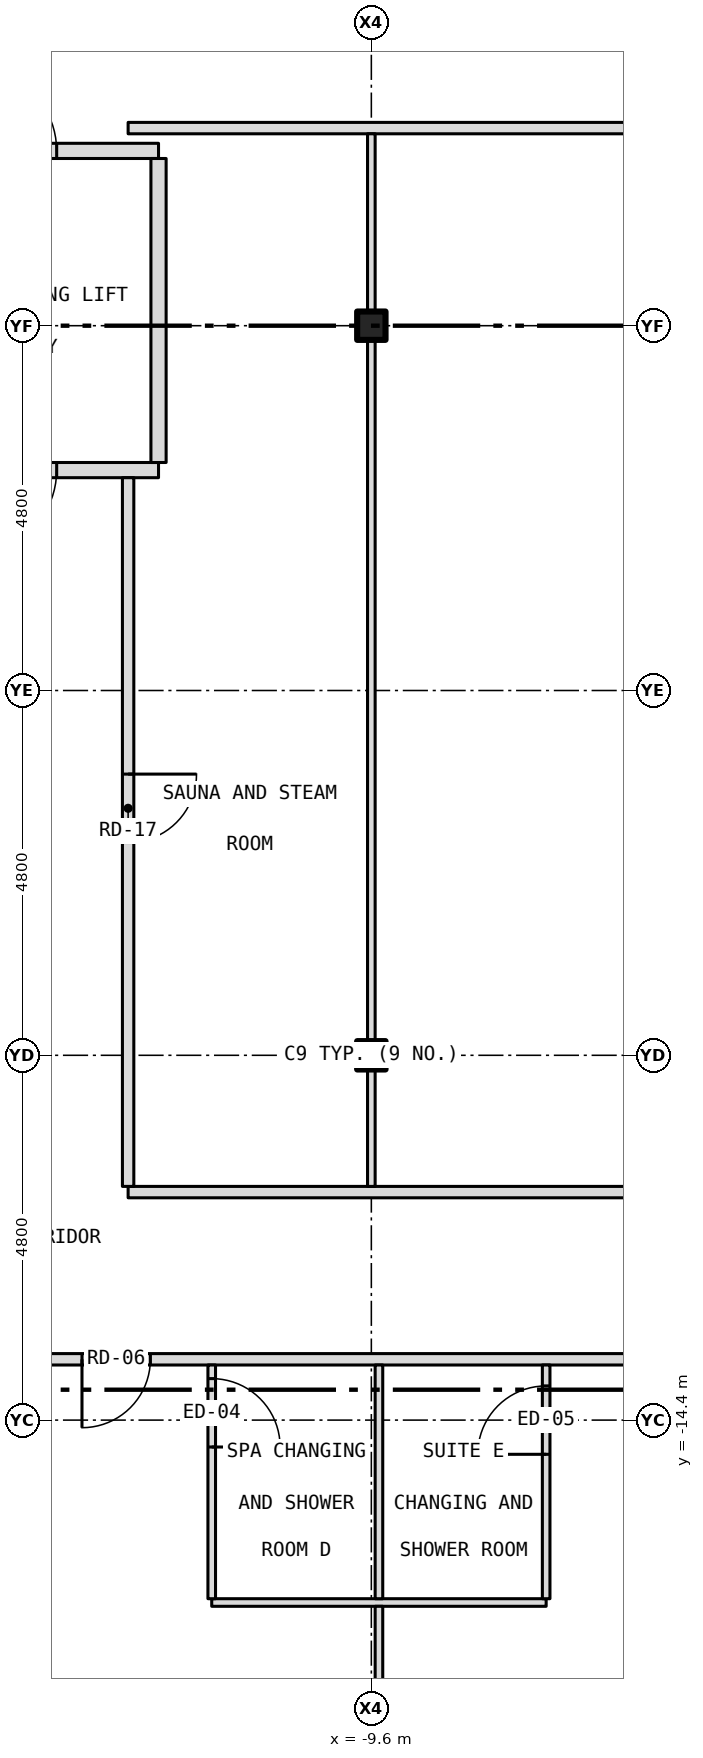
"""IFC4 building model, lengths in metres.
Left out: names, types, materials, properties, quantities, classifications, styles, units other than length and angle.
Written with IfcOpenShell. Run it as: python <this file> out.ifc"""

import sys

from ifc_helpers import new_model, si_unit, direction, frame, frame_2d, origin, origin_2d, place, context, subcontext, project, spatial, rectangle, i_section, extrude, element, fill, save


model = new_model("IFC4")
c1 = context("Model", 3, precision=1e-05, world=origin(), true_north=direction((0.0, 1.0)))
c2 = subcontext(c1, "Body", "Model", "MODEL_VIEW")
j1 = project(units=[si_unit("LENGTHUNIT", "METRE"), si_unit("PLANEANGLEUNIT", "RADIAN")], contexts=[c1])
p1 = place(None, origin())
s1 = spatial("IfcSite", under=j1, at=p1, CompositionType="ELEMENT")
p2 = place(p1, origin())
s2 = spatial("IfcBuilding", under=s1, at=p2, CompositionType="ELEMENT")
p3 = place(p2, frame((0.0, 0.0, 142.5)))
s3 = spatial("IfcBuildingStorey", under=s2, at=p3, CompositionType="ELEMENT", Elevation=142.5)
for number, where, z_axis, x_axis in (
    (1, (-9.6, -9.6, -0.2), (0.0, 0.0, 1.0), (1.0, 0.0, 0.0)),
    (2, (-9.6, 0.0, -0.2), (0.0, 0.0, 1.0), (1.0, 0.0, 0.0)),
):
    element("IfcColumn", number, at=place(p3, frame(where, z_axis=z_axis, x_axis=x_axis)), inside=s3, PredefinedType="COLUMN", context=c2, shape_type="SweptSolid", body=[
        extrude(i_section(OverallWidth=0.373, OverallDepth=0.373, WebThickness=0.016, FlangeThickness=0.026, at=origin_2d()), origin(), (0.0, 0.0, 1.0), 5.55),
    ])
p4 = place(p3, frame((-11.7, -16.8, 0.0), z_axis=(0.0, 0.0, 1.0), x_axis=(1.0, 0.0, 0.0)))
e3 = element("IfcWall", 3, at=p4, inside=s3, PredefinedType="PARTITIONING", context=c2, shape_type="SweptSolid", body=[
    extrude(rectangle(XDim=4.4, YDim=0.1, at=frame_2d((2.2, 0.0))), origin(), (0.0, 0.0, 1.0), 5.35),
])
p5 = place(p3, frame((-15.8, -13.6, 0.0), z_axis=(0.0, 0.0, 1.0), x_axis=(1.0, 0.0, 0.0)))
e4 = element("IfcWall", 4, at=p5, inside=s3, PredefinedType="PARTITIONING", context=c2, shape_type="SweptSolid", body=[
    extrude(rectangle(XDim=31.6, YDim=0.15, at=frame_2d((15.8, 0.0))), origin(), (0.0, 0.0, 1.0), 5.35),
])
p6 = place(p5, frame((2.393, 0.0, 0.0)))
e5 = element("IfcOpeningElement", 5, at=p6, cuts=e4, PredefinedType="OPENING", context=c2, shape_type="SweptSolid", body=[
    extrude(rectangle(XDim=0.9, YDim=2.1, at=frame_2d((0.45, 1.05))), frame((0.0, 0.087, 0.0), z_axis=(0.0, -1.0, 0.0), x_axis=(1.0, 0.0, 0.0)), (0.0, 0.0, 1.0), 0.174),
])
p7 = place(p5, frame((13.216, 0.0, 0.0)))
e6 = element("IfcOpeningElement", 6, at=p7, cuts=e4, PredefinedType="OPENING", context=c2, shape_type="SweptSolid", body=[
    extrude(rectangle(XDim=0.9, YDim=2.1, at=frame_2d((0.45, 1.05))), frame((0.0, 0.087, 0.0), z_axis=(0.0, -1.0, 0.0), x_axis=(1.0, 0.0, 0.0)), (0.0, 0.0, 1.0), 0.174),
])
p8 = place(p5, frame((16.622, 0.0, 0.0)))
e7 = element("IfcOpeningElement", 7, at=p8, cuts=e4, PredefinedType="OPENING", context=c2, shape_type="SweptSolid", body=[
    extrude(rectangle(XDim=0.9, YDim=2.1, at=frame_2d((0.45, 1.05))), frame((0.0, 0.087, 0.0), z_axis=(0.0, -1.0, 0.0), x_axis=(1.0, 0.0, 0.0)), (0.0, 0.0, 1.0), 0.174),
])
p9 = place(p5, frame((22.228, 0.0, 0.0)))
e8 = element("IfcOpeningElement", 8, at=p9, cuts=e4, PredefinedType="OPENING", context=c2, shape_type="SweptSolid", body=[
    extrude(rectangle(XDim=0.9, YDim=2.1, at=frame_2d((0.45, 1.05))), frame((0.0, 0.087, 0.0), z_axis=(0.0, -1.0, 0.0), x_axis=(1.0, 0.0, 0.0)), (0.0, 0.0, 1.0), 0.174),
])
p10 = place(p3, frame((-12.8, -11.4, 0.0), z_axis=(0.0, 0.0, 1.0), x_axis=(1.0, 0.0, 0.0)))
e9 = element("IfcWall", 9, at=p10, inside=s3, PredefinedType="PARTITIONING", context=c2, shape_type="SweptSolid", body=[
    extrude(rectangle(XDim=20.3, YDim=0.15, at=frame_2d((10.15, 0.0))), origin(), (0.0, 0.0, 1.0), 5.35),
])
p11 = place(p10, frame((11.3, 0.0, 0.0)))
e10 = element("IfcOpeningElement", 10, at=p11, cuts=e9, PredefinedType="OPENING", context=c2, shape_type="SweptSolid", body=[
    extrude(rectangle(XDim=0.9, YDim=2.1, at=frame_2d((0.45, 1.05))), frame((0.0, 0.087, 0.0), z_axis=(0.0, -1.0, 0.0), x_axis=(1.0, 0.0, 0.0)), (0.0, 0.0, 1.0), 0.174),
])
p12 = place(p3, frame((-15.68, -1.9, 0.0), z_axis=(0.0, 0.0, 1.0), x_axis=(1.0, 0.0, 0.0)))
e11 = element("IfcWall", 11, at=p12, inside=s3, PredefinedType="PARTITIONING", context=c2, shape_type="SweptSolid", body=[
    extrude(rectangle(XDim=3.28, YDim=0.2, at=frame_2d((1.64, 0.0))), origin(), (0.0, 0.0, 1.0), 5.35),
])
p13 = place(p12, frame((0.84, 0.0, 0.0)))
e12 = element("IfcOpeningElement", 12, at=p13, cuts=e11, PredefinedType="OPENING", context=c2, shape_type="SweptSolid", body=[
    extrude(rectangle(XDim=1.1, YDim=2.1, at=frame_2d((0.55, 1.05))), frame((0.0, 0.112, 0.0), z_axis=(0.0, -1.0, 0.0), x_axis=(1.0, 0.0, 0.0)), (0.0, 0.0, 1.0), 0.224),
])
p14 = place(p3, frame((-15.68, 2.3, 0.0), z_axis=(0.0, 0.0, 1.0), x_axis=(1.0, 0.0, 0.0)))
e13 = element("IfcWall", 13, at=p14, inside=s3, PredefinedType="PARTITIONING", context=c2, shape_type="SweptSolid", body=[
    extrude(rectangle(XDim=3.28, YDim=0.2, at=frame_2d((1.64, 0.0))), origin(), (0.0, 0.0, 1.0), 5.35),
])
p15 = place(p14, frame((0.84, 0.0, 0.0)))
e14 = element("IfcOpeningElement", 14, at=p15, cuts=e13, PredefinedType="OPENING", context=c2, shape_type="SweptSolid", body=[
    extrude(rectangle(XDim=1.1, YDim=2.1, at=frame_2d((0.55, 1.05))), frame((0.0, 0.112, 0.0), z_axis=(0.0, -1.0, 0.0), x_axis=(1.0, 0.0, 0.0)), (0.0, 0.0, 1.0), 0.224),
])
p16 = place(p3, frame((-12.8, 2.6, 0.0), z_axis=(0.0, 0.0, 1.0), x_axis=(1.0, 0.0, 0.0)))
e15 = element("IfcWall", 15, at=p16, inside=s3, PredefinedType="PARTITIONING", context=c2, shape_type="SweptSolid", body=[
    extrude(rectangle(XDim=20.3, YDim=0.15, at=frame_2d((10.15, 0.0))), origin(), (0.0, 0.0, 1.0), 5.35),
])
p17 = place(p3, frame((-12.8, -11.325, 0.0), z_axis=(0.0, 0.0, 1.0), x_axis=(0.0, 1.0, 0.0)))
e16 = element("IfcWall", 16, at=p17, inside=s3, PredefinedType="PARTITIONING", context=c2, shape_type="SweptSolid", body=[
    extrude(rectangle(XDim=9.325, YDim=0.15, at=frame_2d((4.663, 0.0))), origin(), (0.0, 0.0, 1.0), 5.35),
])
p18 = place(p17, frame((4.525, 0.0, 0.0)))
e17 = element("IfcOpeningElement", 17, at=p18, cuts=e16, PredefinedType="OPENING", context=c2, shape_type="SweptSolid", body=[
    extrude(rectangle(XDim=0.9, YDim=2.1, at=frame_2d((0.45, 1.05))), frame((0.0, 0.087, 0.0), z_axis=(0.0, -1.0, 0.0), x_axis=(1.0, 0.0, 0.0)), (0.0, 0.0, 1.0), 0.174),
])
p19 = place(p3, frame((-12.4, -1.8, 0.0), z_axis=(0.0, 0.0, 1.0), x_axis=(0.0, 1.0, 0.0)))
e18 = element("IfcWall", 18, at=p19, inside=s3, PredefinedType="PARTITIONING", context=c2, shape_type="SweptSolid", body=[
    extrude(rectangle(XDim=4.0, YDim=0.2, at=frame_2d((2.0, 0.0))), origin(), (0.0, 0.0, 1.0), 5.35),
])
p20 = place(p3, frame((-11.7, -16.75, 0.0), z_axis=(0.0, 0.0, 1.0), x_axis=(0.0, 1.0, 0.0)))
e19 = element("IfcWall", 19, at=p20, inside=s3, PredefinedType="PARTITIONING", context=c2, shape_type="SweptSolid", body=[
    extrude(rectangle(XDim=3.075, YDim=0.1, at=frame_2d((1.538, 0.0))), origin(), (0.0, 0.0, 1.0), 5.35),
])
p21 = place(p20, frame((1.996, 0.0, 0.0)))
e20 = element("IfcOpeningElement", 20, at=p21, cuts=e19, PredefinedType="OPENING", context=c2, shape_type="SweptSolid", body=[
    extrude(rectangle(XDim=0.9, YDim=2.1, at=frame_2d((0.45, 1.05))), frame((0.0, 0.062, 0.0), z_axis=(0.0, -1.0, 0.0), x_axis=(1.0, 0.0, 0.0)), (0.0, 0.0, 1.0), 0.124),
])
p22 = place(p3, frame((-9.6, -11.325, 0.0), z_axis=(0.0, 0.0, 1.0), x_axis=(0.0, 1.0, 0.0)))
e21 = element("IfcWall", 21, at=p22, inside=s3, PredefinedType="PARTITIONING", context=c2, shape_type="SweptSolid", body=[
    extrude(rectangle(XDim=1.538, YDim=0.1, at=frame_2d((0.769, 0.0))), origin(), (0.0, 0.0, 1.0), 4.728),
])
p23 = place(p3, frame((-9.6, -9.787, 0.0), z_axis=(0.0, 0.0, 1.0), x_axis=(0.0, 1.0, 0.0)))
e22 = element("IfcWall", 22, at=p23, inside=s3, PredefinedType="PARTITIONING", context=c2, shape_type="SweptSolid", body=[
    extrude(rectangle(XDim=0.374, YDim=0.1, at=frame_2d((0.187, 0.0))), origin(), (0.0, 0.0, 1.0), 5.35),
])
p24 = place(p3, frame((-9.6, -9.413, 0.0), z_axis=(0.0, 0.0, 1.0), x_axis=(0.0, 1.0, 0.0)))
e23 = element("IfcWall", 23, at=p24, inside=s3, PredefinedType="PARTITIONING", context=c2, shape_type="SweptSolid", body=[
    extrude(rectangle(XDim=9.226, YDim=0.1, at=frame_2d((4.613, 0.0))), origin(), (0.0, 0.0, 1.0), 4.728),
])
p25 = place(p3, frame((-9.6, -0.187, 0.0), z_axis=(0.0, 0.0, 1.0), x_axis=(0.0, 1.0, 0.0)))
e24 = element("IfcWall", 24, at=p25, inside=s3, PredefinedType="PARTITIONING", context=c2, shape_type="SweptSolid", body=[
    extrude(rectangle(XDim=0.374, YDim=0.1, at=frame_2d((0.187, 0.0))), origin(), (0.0, 0.0, 1.0), 5.35),
])
p26 = place(p3, frame((-9.6, 0.187, 0.0), z_axis=(0.0, 0.0, 1.0), x_axis=(0.0, 1.0, 0.0)))
e25 = element("IfcWall", 25, at=p26, inside=s3, PredefinedType="PARTITIONING", context=c2, shape_type="SweptSolid", body=[
    extrude(rectangle(XDim=2.338, YDim=0.1, at=frame_2d((1.169, 0.0))), origin(), (0.0, 0.0, 1.0), 4.728),
])
p27 = place(p3, frame((-9.5, -22.03, 0.0), z_axis=(0.0, 0.0, 1.0), x_axis=(0.0, 1.0, 0.0)))
e26 = element("IfcWall", 26, at=p27, inside=s3, PredefinedType="PARTITIONING", context=c2, shape_type="SweptSolid", body=[
    extrude(rectangle(XDim=5.18, YDim=0.1, at=frame_2d((2.59, 0.0))), origin(), (0.0, 0.0, 1.0), 4.728),
])
p28 = place(p3, frame((-9.5, -16.75, 0.0), z_axis=(0.0, 0.0, 1.0), x_axis=(0.0, 1.0, 0.0)))
e27 = element("IfcWall", 27, at=p28, inside=s3, PredefinedType="PARTITIONING", context=c2, shape_type="SweptSolid", body=[
    extrude(rectangle(XDim=3.075, YDim=0.1, at=frame_2d((1.538, 0.0))), origin(), (0.0, 0.0, 1.0), 4.728),
])
p29 = place(p3, frame((-7.3, -16.75, 0.0), z_axis=(0.0, 0.0, 1.0), x_axis=(0.0, 1.0, 0.0)))
e28 = element("IfcWall", 28, at=p29, inside=s3, PredefinedType="PARTITIONING", context=c2, shape_type="SweptSolid", body=[
    extrude(rectangle(XDim=3.075, YDim=0.1, at=frame_2d((1.538, 0.0))), origin(), (0.0, 0.0, 1.0), 5.35),
])
p30 = place(p29, frame((1.9, 0.0, 0.0)))
e29 = element("IfcOpeningElement", 29, at=p30, cuts=e28, PredefinedType="OPENING", context=c2, shape_type="SweptSolid", body=[
    extrude(rectangle(XDim=0.9, YDim=2.1, at=frame_2d((0.45, 1.05))), frame((0.0, 0.062, 0.0), z_axis=(0.0, -1.0, 0.0), x_axis=(1.0, 0.0, 0.0)), (0.0, 0.0, 1.0), 0.124),
])
p31 = place(p15, origin())
e30 = element("IfcDoor", 30, at=p31, inside=s3, OperationType="SINGLE_SWING_LEFT", PredefinedType="DOOR", context=c2, shape_type="SweptSolid", body=[
    extrude(rectangle(XDim=1.1, YDim=2.1, at=frame_2d((0.55, 1.05))), frame((0.0, 0.025, 0.0), z_axis=(0.0, -1.0, 0.0), x_axis=(1.0, 0.0, 0.0)), (0.0, 0.0, 1.0), 0.05),
])
fill(e14, e30)
p32 = place(p13, origin())
e31 = element("IfcDoor", 31, at=p32, inside=s3, OperationType="SINGLE_SWING_LEFT", PredefinedType="DOOR", context=c2, shape_type="SweptSolid", body=[
    extrude(rectangle(XDim=1.1, YDim=2.1, at=frame_2d((0.55, 1.05))), frame((0.0, 0.025, 0.0), z_axis=(0.0, -1.0, 0.0), x_axis=(1.0, 0.0, 0.0)), (0.0, 0.0, 1.0), 0.05),
])
fill(e12, e31)
p33 = place(p6, origin())
e32 = element("IfcDoor", 32, at=p33, inside=s3, OperationType="SINGLE_SWING_LEFT", PredefinedType="DOOR", context=c2, shape_type="SweptSolid", body=[
    extrude(rectangle(XDim=0.9, YDim=2.1, at=frame_2d((0.45, 1.05))), frame((0.0, 0.025, 0.0), z_axis=(0.0, -1.0, 0.0), x_axis=(1.0, 0.0, 0.0)), (0.0, 0.0, 1.0), 0.05),
])
fill(e5, e32)
p34 = place(p21, origin())
e33 = element("IfcDoor", 33, at=p34, inside=s3, OperationType="SINGLE_SWING_LEFT", PredefinedType="DOOR", context=c2, shape_type="SweptSolid", body=[
    extrude(rectangle(XDim=0.9, YDim=2.1, at=frame_2d((0.45, 1.05))), frame((0.0, 0.025, 0.0), z_axis=(0.0, -1.0, 0.0), x_axis=(1.0, 0.0, 0.0)), (0.0, 0.0, 1.0), 0.05),
])
fill(e20, e33)
p35 = place(p30, origin())
e34 = element("IfcDoor", 34, at=p35, inside=s3, OperationType="SINGLE_SWING_LEFT", PredefinedType="DOOR", context=c2, shape_type="SweptSolid", body=[
    extrude(rectangle(XDim=0.9, YDim=2.1, at=frame_2d((0.45, 1.05))), frame((0.0, 0.025, 0.0), z_axis=(0.0, -1.0, 0.0), x_axis=(1.0, 0.0, 0.0)), (0.0, 0.0, 1.0), 0.05),
])
fill(e29, e34)
p36 = place(p18, origin())
e35 = element("IfcDoor", 35, at=p36, inside=s3, OperationType="SINGLE_SWING_RIGHT", PredefinedType="DOOR", context=c2, shape_type="SweptSolid", body=[
    extrude(rectangle(XDim=0.9, YDim=2.1, at=frame_2d((0.45, 1.05))), frame((0.0, 0.025, 0.0), z_axis=(0.0, -1.0, 0.0), x_axis=(1.0, 0.0, 0.0)), (0.0, 0.0, 1.0), 0.05),
])
fill(e17, e35)
save(model, sys.argv[1])
